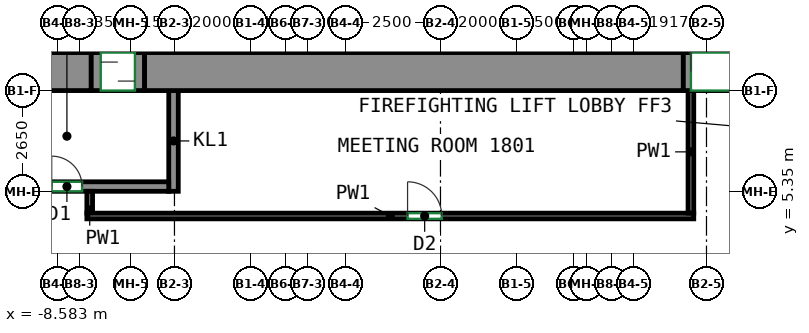
"""IFC4 building model, lengths in metres.
Left out: names, types, materials, properties, quantities, classifications, styles, units other than length and angle.
Written with IfcOpenShell. Run it as: python <this file> out.ifc"""

import sys

from ifc_helpers import new_model, si_unit, direction, frame, frame_2d, origin, place, context, subcontext, project, spatial, rectangle, extrude, source, transform, mapped, element, fill, save


model = new_model("IFC4")
c1 = context("Model", 3, precision=1e-05, world=origin(), true_north=direction((0.0, 1.0)))
c2 = subcontext(c1, "Body", "Model", "MODEL_VIEW")
j1 = project(units=[si_unit("LENGTHUNIT", "METRE"), si_unit("PLANEANGLEUNIT", "RADIAN")], contexts=[c1])
p1 = place(None, origin())
s1 = spatial("IfcSite", under=j1, at=p1, CompositionType="ELEMENT")
p2 = place(p1, origin())
s2 = spatial("IfcBuilding", under=s1, at=p2, CompositionType="ELEMENT")
p3 = place(p2, frame((0.0, 0.0, 79.2)))
s3 = spatial("IfcBuildingStorey", under=s2, at=p3, CompositionType="ELEMENT", Elevation=79.2)
m1 = source(origin(), c2, "Body", "SweptSolid", [
    extrude(rectangle(XDim=1.28, YDim=1.0, at=frame_2d((0.64, 0.0))), origin(), (0.0, 0.0, 1.0), 3.72),
])
p4 = place(p3, frame((-8.97, 8.5, 0.0), z_axis=(0.0, 0.0, 1.0), x_axis=(1.0, 0.0, 0.0)))
e1 = element("IfcWall", 1, at=p4, inside=s3, PredefinedType="SHEAR", context=c2, shape_type="MappedRepresentation", body=[
    mapped(m1, transform((0.0, 0.0, 0.0))),
])
m2 = source(origin(), c2, "Body", "SweptSolid", [
    extrude(rectangle(XDim=14.18, YDim=1.0, at=frame_2d((7.09, 0.0))), origin(), (0.0, 0.0, 1.0), 3.72),
])
p5 = place(p3, frame((-6.29, 8.5, 0.0), z_axis=(0.0, 0.0, 1.0), x_axis=(1.0, 0.0, 0.0)))
e2 = element("IfcWall", 2, at=p5, inside=s3, PredefinedType="SHEAR", context=c2, shape_type="MappedRepresentation", body=[
    mapped(m2, transform((0.0, 0.0, 0.0))),
])
m3 = source(origin(), c2, "Body", "SweptSolid", [
    extrude(rectangle(XDim=2.65, YDim=0.25, at=frame_2d((1.325, 0.0))), origin(), (0.0, 0.0, 1.0), 3.72),
])
p6 = place(p3, frame((-5.525, 5.35, 0.0), z_axis=(0.0, 0.0, 1.0), x_axis=(0.0, 1.0, 0.0)))
e3 = element("IfcWall", 3, at=p6, inside=s3, PredefinedType="PARTITIONING", context=c2, shape_type="MappedRepresentation", body=[
    mapped(m3, transform((0.0, 0.0, 0.0))),
])
m4 = source(origin(), c2, "Body", "SweptSolid", [
    extrude(rectangle(XDim=5.36, YDim=0.25, at=frame_2d((2.68, 0.0))), origin(), (0.0, 0.0, 1.0), 3.72),
])
p7 = place(p3, frame((-11.01, 5.475, 0.0), z_axis=(0.0, 0.0, 1.0), x_axis=(1.0, 0.0, 0.0)))
e4 = element("IfcWall", 4, at=p7, inside=s3, PredefinedType="PARTITIONING", context=c2, shape_type="MappedRepresentation", body=[
    mapped(m4, transform((0.0, 0.0, 0.0))),
])
p8 = place(p7, frame((2.28, 0.0, 0.0)))
e5 = element("IfcOpeningElement", 5, at=p8, cuts=e4, PredefinedType="OPENING", context=c2, shape_type="SweptSolid", body=[
    extrude(rectangle(XDim=0.8, YDim=2.0, at=frame_2d((0.4, 1.0))), frame((0.0, 0.135, 0.0), z_axis=(0.0, -1.0, 0.0), x_axis=(1.0, 0.0, 0.0)), (0.0, 0.0, 1.0), 0.27),
])
m5 = source(origin(), c2, "Body", "SweptSolid", [
    extrude(rectangle(XDim=1.4, YDim=1.0, at=frame_2d((0.7, 0.0))), origin(), (0.0, 0.0, 1.0), 2.7),
])
p9 = place(p3, frame((-7.69, 8.5, 0.0), z_axis=(0.0, 0.0, 1.0), x_axis=(1.0, 0.0, 0.0)))
e6 = element("IfcWall", 6, at=p9, inside=s3, PredefinedType="PARTITIONING", context=c2, shape_type="MappedRepresentation", body=[
    mapped(m5, transform((0.0, 0.0, 0.0))),
])
p10 = place(p9, frame((0.25, 0.0, 0.0)))
e7 = element("IfcOpeningElement", 7, at=p10, cuts=e6, PredefinedType="OPENING", context=c2, shape_type="SweptSolid", body=[
    extrude(rectangle(XDim=0.9, YDim=2.1, at=frame_2d((0.45, 1.05))), frame((0.0, 0.51, 0.0), z_axis=(0.0, -1.0, 0.0), x_axis=(1.0, 0.0, 0.0)), (0.0, 0.0, 1.0), 1.02),
])
m6 = source(origin(), c2, "Body", "SweptSolid", [
    extrude(rectangle(XDim=2.4, YDim=1.0, at=frame_2d((1.2, 0.0))), origin(), (0.0, 0.0, 1.0), 2.7),
])
p11 = place(p3, frame((7.89, 8.5, 0.0), z_axis=(0.0, 0.0, 1.0), x_axis=(1.0, 0.0, 0.0)))
e8 = element("IfcWall", 8, at=p11, inside=s3, PredefinedType="PARTITIONING", context=c2, shape_type="MappedRepresentation", body=[
    mapped(m6, transform((0.0, 0.0, 0.0))),
])
p12 = place(p11, frame((0.2, 0.0, 0.0)))
e9 = element("IfcOpeningElement", 9, at=p12, cuts=e8, PredefinedType="OPENING", context=c2, shape_type="SweptSolid", body=[
    extrude(rectangle(XDim=2.0, YDim=2.1, at=frame_2d((1.0, 1.05))), frame((0.0, 0.51, 0.0), z_axis=(0.0, -1.0, 0.0), x_axis=(1.0, 0.0, 0.0)), (0.0, 0.0, 1.0), 1.02),
])
p13 = place(p3, frame((-7.73, 4.775, 0.0), z_axis=(0.0, 0.0, 1.0), x_axis=(0.0, 1.0, 0.0)))
e10 = element("IfcWall", 10, at=p13, inside=s3, PredefinedType="PARTITIONING", context=c2, shape_type="SweptSolid", body=[
    extrude(rectangle(XDim=0.575, YDim=0.15, at=frame_2d((0.288, 0.0))), origin(), (0.0, 0.0, 1.0), 3.72),
])
p14 = place(p3, frame((-7.805, 4.7, 0.0), z_axis=(0.0, 0.0, 1.0), x_axis=(1.0, 0.0, 0.0)))
e11 = element("IfcWall", 11, at=p14, inside=s3, PredefinedType="PARTITIONING", context=c2, shape_type="SweptSolid", body=[
    extrude(rectangle(XDim=15.97, YDim=0.15, at=frame_2d((7.985, 0.0))), origin(), (0.0, 0.0, 1.0), 3.72),
])
p15 = place(p14, frame((8.439, 0.0, 0.0)))
e12 = element("IfcOpeningElement", 12, at=p15, cuts=e11, PredefinedType="OPENING", context=c2, shape_type="SweptSolid", body=[
    extrude(rectangle(XDim=0.9, YDim=2.1, at=frame_2d((0.45, 1.05))), frame((0.0, 0.085, 0.0), z_axis=(0.0, -1.0, 0.0), x_axis=(1.0, 0.0, 0.0)), (0.0, 0.0, 1.0), 0.17),
])
p16 = place(p3, frame((8.09, 8.0, 0.0), z_axis=(0.0, 0.0, 1.0), x_axis=(0.0, -1.0, 0.0)))
e13 = element("IfcWall", 13, at=p16, inside=s3, PredefinedType="PARTITIONING", context=c2, shape_type="SweptSolid", body=[
    extrude(rectangle(XDim=3.225, YDim=0.15, at=frame_2d((1.613, 0.0))), origin(), (0.0, 0.0, 1.0), 3.72),
])
p17 = place(p12, origin())
e14 = element("IfcDoor", 14, at=p17, inside=s3, OperationType="DOUBLE_DOOR_SINGLE_SWING", PredefinedType="DOOR", context=c2, shape_type="SweptSolid", body=[
    extrude(rectangle(XDim=2.0, YDim=2.1, at=frame_2d((1.0, 1.05))), frame((0.0, 0.405, 0.0), z_axis=(0.0, -1.0, 0.0), x_axis=(1.0, 0.0, 0.0)), (0.0, 0.0, 1.0), 0.05),
])
fill(e9, e14)
p18 = place(p8, origin())
e15 = element("IfcDoor", 15, at=p18, inside=s3, OperationType="SINGLE_SWING_LEFT", PredefinedType="DOOR", context=c2, shape_type="SweptSolid", body=[
    extrude(rectangle(XDim=0.8, YDim=2.0, at=frame_2d((0.4, 1.0))), frame((0.0, 0.025, 0.0), z_axis=(0.0, -1.0, 0.0), x_axis=(1.0, 0.0, 0.0)), (0.0, 0.0, 1.0), 0.05),
])
fill(e5, e15)
p19 = place(p10, origin())
e16 = element("IfcDoor", 16, at=p19, inside=s3, OperationType="SLIDING_TO_RIGHT", PredefinedType="DOOR", context=c2, shape_type="SweptSolid", body=[
    extrude(rectangle(XDim=0.9, YDim=2.1, at=frame_2d((0.45, 1.05))), frame((0.0, 0.405, 0.0), z_axis=(0.0, -1.0, 0.0), x_axis=(1.0, 0.0, 0.0)), (0.0, 0.0, 1.0), 0.05),
])
fill(e7, e16)
p20 = place(p15, origin())
e17 = element("IfcDoor", 17, at=p20, inside=s3, OperationType="SINGLE_SWING_LEFT", PredefinedType="DOOR", context=c2, shape_type="SweptSolid", body=[
    extrude(rectangle(XDim=0.9, YDim=2.1, at=frame_2d((0.45, 1.05))), frame((0.0, 0.025, 0.0), z_axis=(0.0, -1.0, 0.0), x_axis=(1.0, 0.0, 0.0)), (0.0, 0.0, 1.0), 0.05),
])
fill(e12, e17)
save(model, sys.argv[1])
